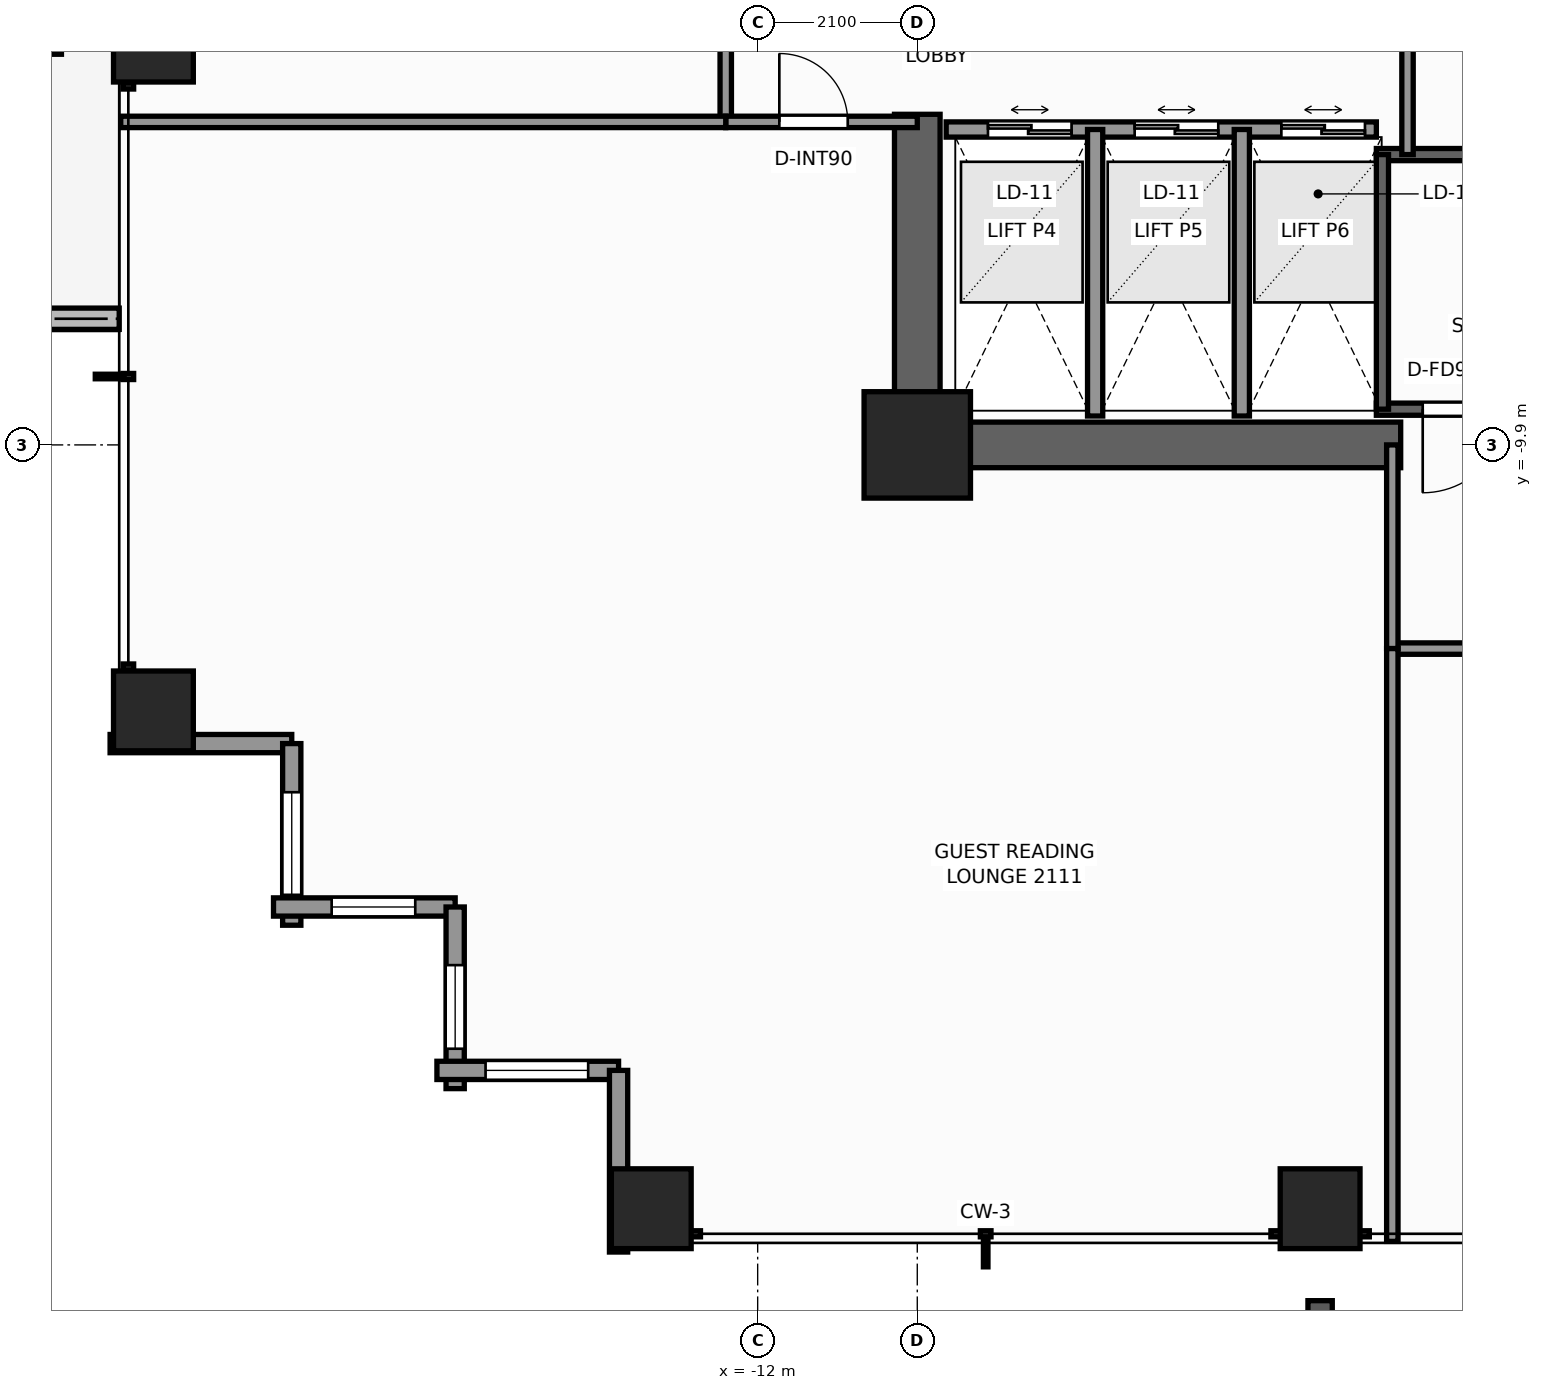
"""IFC4 building model, lengths in metres.
Left out: names, types, materials, properties, quantities, classifications, styles, units other than length and angle.
Written with IfcOpenShell. Run it as: python <this file> out.ifc"""

import sys

from ifc_helpers import new_model, si_unit, direction, frame, frame_2d, origin, origin_2d, place, context, subcontext, project, spatial, rectangle, extrude, element, fill, save


model = new_model("IFC4")
c1 = context("Model", 3, precision=1e-05, world=origin(), true_north=direction((0.0, 1.0)))
c2 = subcontext(c1, "Body", "Model", "MODEL_VIEW")
j1 = project(units=[si_unit("LENGTHUNIT", "METRE"), si_unit("PLANEANGLEUNIT", "RADIAN")], contexts=[c1])
p1 = place(None, origin())
s1 = spatial("IfcSite", under=j1, at=p1, CompositionType="ELEMENT")
p2 = place(p1, origin())
s2 = spatial("IfcBuilding", under=s1, at=p2, CompositionType="ELEMENT")
p3 = place(p2, frame((0.0, 0.0, 75.5)))
s3 = spatial("IfcBuildingStorey", under=s2, at=p3, CompositionType="ELEMENT", Elevation=75.5)
p4 = place(p3, frame((-3.54, -9.9, 0.0), z_axis=(0.0, 0.0, 1.0), x_axis=(-1.0, 0.0, 0.0)))
e1 = element("IfcWall", 1, at=p4, inside=s3, PredefinedType="SHEAR", context=c2, shape_type="SweptSolid", body=[
    extrude(rectangle(XDim=6.66, YDim=0.6, at=frame_2d((3.33, 0.0))), origin(), (0.0, 0.0, 1.0), 3.3),
])
p5 = place(p3, frame((-9.9, -9.6, 0.0), z_axis=(0.0, 0.0, 1.0), x_axis=(0.0, 1.0, 0.0)))
e2 = element("IfcWall", 2, at=p5, inside=s3, PredefinedType="SHEAR", context=c2, shape_type="SweptSolid", body=[
    extrude(rectangle(XDim=4.05, YDim=0.6, at=frame_2d((2.025, 0.0))), origin(), (0.0, 0.0, 1.0), 3.3),
])
p6 = place(p3, frame((-9.9, -9.9, 0.0), z_axis=(0.0, 0.0, 1.0), x_axis=(1.0, 0.0, 0.0)))
e3 = element("IfcColumn", 3, at=p6, inside=s3, PredefinedType="COLUMN", context=c2, shape_type="SweptSolid", body=[
    extrude(rectangle(XDim=1.4, YDim=1.4, at=origin_2d()), origin(), (0.0, 0.0, 1.0), 3.3),
])
for number, where, z_axis, x_axis in (
    (4, (-13.4, -19.95, 0.0), (0.0, 0.0, 1.0), (1.0, 0.0, 0.0)),
    (5, (-4.6, -19.95, 0.0), (0.0, 0.0, 1.0), (1.0, 0.0, 0.0)),
    (6, (-19.95, -13.4, 0.0), (0.0, 0.0, 1.0), (1.0, 0.0, 0.0)),
    (7, (-19.95, -4.6, 0.0), (0.0, 0.0, 1.0), (1.0, 0.0, 0.0)),
):
    element("IfcColumn", number, at=place(p3, frame(where, z_axis=z_axis, x_axis=x_axis)), inside=s3, PredefinedType="COLUMN", context=c2, shape_type="SweptSolid", body=[
        extrude(rectangle(XDim=1.05, YDim=1.05, at=origin_2d()), origin(), (0.0, 0.0, 1.0), 3.3),
    ])
p7 = place(p3, frame((-22.406, -8.24, -0.04), z_axis=(0.0, 0.0, 1.0), x_axis=(1.0, 0.0, 0.0)))
e8 = element("IfcWall", 8, at=p7, inside=s3, PredefinedType="PARAPET", context=c2, shape_type="SweptSolid", body=[
    extrude(rectangle(XDim=2.006, YDim=0.28, at=frame_2d((1.003, 0.0))), origin(), (0.0, 0.0, 1.0), 0.42),
])
p8 = place(p3, frame((-18.13, -13.83, 0.0), z_axis=(0.0, 0.0, 1.0), x_axis=(-1.0, 0.0, 0.0)))
e9 = element("IfcWall", 9, at=p8, inside=s3, PredefinedType="STANDARD", context=c2, shape_type="SweptSolid", body=[
    extrude(rectangle(XDim=2.39, YDim=0.24, at=frame_2d((1.195, 0.0))), origin(), (0.0, 0.0, 1.0), 2.459),
])
p9 = place(p3, frame((-18.13, -16.22, 0.0), z_axis=(0.0, 0.0, 1.0), x_axis=(0.0, 1.0, 0.0)))
e10 = element("IfcWall", 10, at=p9, inside=s3, PredefinedType="STANDARD", context=c2, shape_type="SweptSolid", body=[
    extrude(rectangle(XDim=2.39, YDim=0.24, at=frame_2d((1.195, 0.0))), origin(), (0.0, 0.0, 1.0), 2.459),
])
p10 = place(p9, frame((0.4, 0.0, 0.65)))
e11 = element("IfcOpeningElement", 11, at=p10, cuts=e10, PredefinedType="OPENING", context=c2, shape_type="SweptSolid", body=[
    extrude(rectangle(XDim=1.35, YDim=1.55, at=frame_2d((0.675, 0.775))), frame((0.0, 0.13, 0.0), z_axis=(0.0, -1.0, 0.0), x_axis=(1.0, 0.0, 0.0)), (0.0, 0.0, 1.0), 0.26),
])
p11 = place(p3, frame((-15.98, -15.98, 0.0), z_axis=(0.0, 0.0, 1.0), x_axis=(-1.0, 0.0, 0.0)))
e12 = element("IfcWall", 12, at=p11, inside=s3, PredefinedType="STANDARD", context=c2, shape_type="SweptSolid", body=[
    extrude(rectangle(XDim=2.39, YDim=0.24, at=frame_2d((1.195, 0.0))), origin(), (0.0, 0.0, 1.0), 2.459),
])
p12 = place(p11, frame((0.525, 0.0, 0.65)))
e13 = element("IfcOpeningElement", 13, at=p12, cuts=e12, PredefinedType="OPENING", context=c2, shape_type="SweptSolid", body=[
    extrude(rectangle(XDim=1.1, YDim=1.45, at=frame_2d((0.55, 0.725))), frame((0.0, 0.13, 0.0), z_axis=(0.0, -1.0, 0.0), x_axis=(1.0, 0.0, 0.0)), (0.0, 0.0, 1.0), 0.26),
])
p13 = place(p3, frame((-15.98, -18.37, 0.0), z_axis=(0.0, 0.0, 1.0), x_axis=(0.0, 1.0, 0.0)))
e14 = element("IfcWall", 14, at=p13, inside=s3, PredefinedType="STANDARD", context=c2, shape_type="SweptSolid", body=[
    extrude(rectangle(XDim=2.39, YDim=0.24, at=frame_2d((1.195, 0.0))), origin(), (0.0, 0.0, 1.0), 2.459),
])
p14 = place(p13, frame((0.525, 0.0, 0.65)))
e15 = element("IfcOpeningElement", 15, at=p14, cuts=e14, PredefinedType="OPENING", context=c2, shape_type="SweptSolid", body=[
    extrude(rectangle(XDim=1.1, YDim=1.45, at=frame_2d((0.55, 0.725))), frame((0.0, 0.13, 0.0), z_axis=(0.0, -1.0, 0.0), x_axis=(1.0, 0.0, 0.0)), (0.0, 0.0, 1.0), 0.26),
])
p15 = place(p3, frame((-13.83, -18.13, 0.0), z_axis=(0.0, 0.0, 1.0), x_axis=(-1.0, 0.0, 0.0)))
e16 = element("IfcWall", 16, at=p15, inside=s3, PredefinedType="STANDARD", context=c2, shape_type="SweptSolid", body=[
    extrude(rectangle(XDim=2.39, YDim=0.24, at=frame_2d((1.195, 0.0))), origin(), (0.0, 0.0, 1.0), 2.459),
])
p16 = place(p15, frame((0.4, 0.0, 0.65)))
e17 = element("IfcOpeningElement", 17, at=p16, cuts=e16, PredefinedType="OPENING", context=c2, shape_type="SweptSolid", body=[
    extrude(rectangle(XDim=1.35, YDim=1.55, at=frame_2d((0.675, 0.775))), frame((0.0, 0.13, 0.0), z_axis=(0.0, -1.0, 0.0), x_axis=(1.0, 0.0, 0.0)), (0.0, 0.0, 1.0), 0.26),
])
p17 = place(p3, frame((-13.83, -20.52, 0.0), z_axis=(0.0, 0.0, 1.0), x_axis=(0.0, 1.0, 0.0)))
e18 = element("IfcWall", 18, at=p17, inside=s3, PredefinedType="STANDARD", context=c2, shape_type="SweptSolid", body=[
    extrude(rectangle(XDim=2.39, YDim=0.24, at=frame_2d((1.195, 0.0))), origin(), (0.0, 0.0, 1.0), 2.459),
])
p18 = place(p3, frame((3.86, -9.43, 0.0), z_axis=(0.0, 0.0, 1.0), x_axis=(-1.0, 0.0, 0.0)))
e19 = element("IfcWall", 19, at=p18, inside=s3, PredefinedType="SHEAR", context=c2, shape_type="SweptSolid", body=[
    extrude(rectangle(XDim=7.72, YDim=0.16, at=frame_2d((3.86, 0.0))), origin(), (0.0, 0.0, 1.0), 3.3),
])
p19 = place(p18, frame((6.01, 0.0, 0.0)))
e20 = element("IfcOpeningElement", 20, at=p19, cuts=e19, PredefinedType="OPENING", context=c2, shape_type="SweptSolid", body=[
    extrude(rectangle(XDim=1.1, YDim=2.2, at=frame_2d((0.55, 1.1))), frame((0.0, 0.09, 0.0), z_axis=(0.0, -1.0, 0.0), x_axis=(1.0, 0.0, 0.0)), (0.0, 0.0, 1.0), 0.18),
])
p20 = place(p3, frame((-3.86, -6.08, 0.0), z_axis=(0.0, 0.0, 1.0), x_axis=(1.0, 0.0, 0.0)))
e21 = element("IfcWall", 21, at=p20, inside=s3, PredefinedType="SHEAR", context=c2, shape_type="SweptSolid", body=[
    extrude(rectangle(XDim=7.72, YDim=0.16, at=frame_2d((3.86, 0.0))), origin(), (0.0, 0.0, 1.0), 3.3),
])
p21 = place(p3, frame((-3.78, -9.43, 0.0), z_axis=(0.0, 0.0, 1.0), x_axis=(0.0, 1.0, 0.0)))
e22 = element("IfcWall", 22, at=p21, inside=s3, PredefinedType="SHEAR", context=c2, shape_type="SweptSolid", body=[
    extrude(rectangle(XDim=3.35, YDim=0.16, at=frame_2d((1.675, 0.0))), origin(), (0.0, 0.0, 1.0), 3.3),
])
p22 = place(p3, frame((-9.52, -5.75, 0.0), z_axis=(0.0, 0.0, 1.0), x_axis=(1.0, 0.0, 0.0)))
e23 = element("IfcWall", 23, at=p22, inside=s3, PredefinedType="SOLIDWALL", context=c2, shape_type="SweptSolid", body=[
    extrude(rectangle(XDim=5.66, YDim=0.2, at=frame_2d((2.83, 0.0))), origin(), (0.0, 0.0, 1.0), 3.08),
])
p23 = place(p22, frame((0.55, 0.0, 0.0)))
e24 = element("IfcOpeningElement", 24, at=p23, cuts=e23, PredefinedType="OPENING", context=c2, shape_type="SweptSolid", body=[
    extrude(rectangle(XDim=1.1, YDim=2.2, at=frame_2d((0.55, 1.1))), frame((0.0, 0.11, 0.0), z_axis=(0.0, -1.0, 0.0), x_axis=(1.0, 0.0, 0.0)), (0.0, 0.0, 1.0), 0.22),
])
p24 = place(p22, frame((2.48, 0.0, 0.0)))
e25 = element("IfcOpeningElement", 25, at=p24, cuts=e23, PredefinedType="OPENING", context=c2, shape_type="SweptSolid", body=[
    extrude(rectangle(XDim=1.1, YDim=2.2, at=frame_2d((0.55, 1.1))), frame((0.0, 0.11, 0.0), z_axis=(0.0, -1.0, 0.0), x_axis=(1.0, 0.0, 0.0)), (0.0, 0.0, 1.0), 0.22),
])
p25 = place(p22, frame((4.41, 0.0, 0.0)))
e26 = element("IfcOpeningElement", 26, at=p25, cuts=e23, PredefinedType="OPENING", context=c2, shape_type="SweptSolid", body=[
    extrude(rectangle(XDim=1.1, YDim=2.2, at=frame_2d((0.55, 1.1))), frame((0.0, 0.11, 0.0), z_axis=(0.0, -1.0, 0.0), x_axis=(1.0, 0.0, 0.0)), (0.0, 0.0, 1.0), 0.22),
])
for number, where, z_axis, x_axis in (
    (27, (-7.56, -9.52, 0.0), (0.0, 0.0, 1.0), (0.0, 1.0, 0.0)),
    (28, (-5.63, -9.52, 0.0), (0.0, 0.0, 1.0), (0.0, 1.0, 0.0)),
):
    element("IfcWall", number, at=place(p3, frame(where, z_axis=z_axis, x_axis=x_axis)), inside=s3, PredefinedType="SOLIDWALL", context=c2, shape_type="SweptSolid", body=[
        extrude(rectangle(XDim=3.77, YDim=0.2, at=frame_2d((1.885, 0.0))), origin(), (0.0, 0.0, 1.0), 3.08),
    ])
p26 = place(p3, frame((-3.45, -6.08, 0.0), z_axis=(0.0, 0.0, 1.0), x_axis=(0.0, 1.0, 0.0)))
e29 = element("IfcWall", 29, at=p26, inside=s3, PredefinedType="PARTITIONING", context=c2, shape_type="SweptSolid", body=[
    extrude(rectangle(XDim=2.36, YDim=0.15, at=frame_2d((1.18, 0.0))), origin(), (0.0, 0.0, 1.0), 3.08),
])
p27 = place(p3, frame((-3.65, -12.58, 0.0), z_axis=(0.0, 0.0, 1.0), x_axis=(1.0, 0.0, 0.0)))
e30 = element("IfcWall", 30, at=p27, inside=s3, PredefinedType="PARTITIONING", context=c2, shape_type="SweptSolid", body=[
    extrude(rectangle(XDim=16.23, YDim=0.15, at=frame_2d((8.115, 0.0))), origin(), (0.0, 0.0, 1.0), 2.292),
])
p28 = place(p27, frame((1.405, 0.0, 0.0)))
e31 = element("IfcOpeningElement", 31, at=p28, cuts=e30, PredefinedType="OPENING", context=c2, shape_type="SweptSolid", body=[
    extrude(rectangle(XDim=0.95, YDim=2.06, at=frame_2d((0.475, 1.03))), frame((0.0, 0.085, 0.0), z_axis=(0.0, -1.0, 0.0), x_axis=(1.0, 0.0, 0.0)), (0.0, 0.0, 1.0), 0.17),
])
p29 = place(p27, frame((9.469, 0.0, 0.0)))
e32 = element("IfcOpeningElement", 32, at=p29, cuts=e30, PredefinedType="OPENING", context=c2, shape_type="SweptSolid", body=[
    extrude(rectangle(XDim=0.9, YDim=2.06, at=frame_2d((0.45, 1.03))), frame((0.0, 0.085, 0.0), z_axis=(0.0, -1.0, 0.0), x_axis=(1.0, 0.0, 0.0)), (0.0, 0.0, 1.0), 0.17),
])
p30 = place(p27, frame((11.629, 0.0, 0.0)))
e33 = element("IfcOpeningElement", 33, at=p30, cuts=e30, PredefinedType="OPENING", context=c2, shape_type="SweptSolid", body=[
    extrude(rectangle(XDim=0.95, YDim=2.06, at=frame_2d((0.475, 1.03))), frame((0.0, 0.085, 0.0), z_axis=(0.0, -1.0, 0.0), x_axis=(1.0, 0.0, 0.0)), (0.0, 0.0, 1.0), 0.17),
])
p31 = place(p3, frame((-3.65, -12.58, 0.0), z_axis=(0.0, 0.0, 1.0), x_axis=(0.0, 1.0, 0.0)))
e34 = element("IfcWall", 34, at=p31, inside=s3, PredefinedType="PARTITIONING", context=c2, shape_type="SweptSolid", body=[
    extrude(rectangle(XDim=2.68, YDim=0.15, at=frame_2d((1.34, 0.0))), origin(), (0.0, 0.0, 1.0), 3.08),
])
p32 = place(p3, frame((-12.42, -5.65, 0.0), z_axis=(0.0, 0.0, 1.0), x_axis=(0.0, 1.0, 0.0)))
e35 = element("IfcWall", 35, at=p32, inside=s3, PredefinedType="PARTITIONING", context=c2, shape_type="SweptSolid", body=[
    extrude(rectangle(XDim=3.6, YDim=0.15, at=frame_2d((1.8, 0.0))), origin(), (0.0, 0.0, 1.0), 2.292),
])
p33 = place(p32, frame((2.156, 0.0, 0.0)))
e36 = element("IfcOpeningElement", 36, at=p33, cuts=e35, PredefinedType="OPENING", context=c2, shape_type="SweptSolid", body=[
    extrude(rectangle(XDim=0.9, YDim=2.06, at=frame_2d((0.45, 1.03))), frame((0.0, 0.085, 0.0), z_axis=(0.0, -1.0, 0.0), x_axis=(1.0, 0.0, 0.0)), (0.0, 0.0, 1.0), 0.17),
])
p34 = place(p3, frame((-12.42, -5.65, 0.0), z_axis=(0.0, 0.0, 1.0), x_axis=(1.0, 0.0, 0.0)))
e37 = element("IfcWall", 37, at=p34, inside=s3, PredefinedType="PARTITIONING", context=c2, shape_type="SweptSolid", body=[
    extrude(rectangle(XDim=2.52, YDim=0.15, at=frame_2d((1.26, 0.0))), origin(), (0.0, 0.0, 1.0), 3.08),
])
p35 = place(p34, frame((0.705, 0.0, 0.0)))
e38 = element("IfcOpeningElement", 38, at=p35, cuts=e37, PredefinedType="OPENING", context=c2, shape_type="SweptSolid", body=[
    extrude(rectangle(XDim=0.9, YDim=2.06, at=frame_2d((0.45, 1.03))), frame((0.0, 0.085, 0.0), z_axis=(0.0, -1.0, 0.0), x_axis=(1.0, 0.0, 0.0)), (0.0, 0.0, 1.0), 0.17),
])
p36 = place(p3, frame((-20.38, -5.65, 0.0), z_axis=(0.0, 0.0, 1.0), x_axis=(1.0, 0.0, 0.0)))
e39 = element("IfcWall", 39, at=p36, inside=s3, PredefinedType="PARTITIONING", context=c2, shape_type="SweptSolid", body=[
    extrude(rectangle(XDim=7.96, YDim=0.15, at=frame_2d((3.98, 0.0))), origin(), (0.0, 0.0, 1.0), 2.449),
])
p37 = place(p3, frame((-3.65, -20.38, 0.0), z_axis=(0.0, 0.0, 1.0), x_axis=(0.0, 1.0, 0.0)))
e40 = element("IfcWall", 40, at=p37, inside=s3, PredefinedType="PARTITIONING", context=c2, shape_type="SweptSolid", body=[
    extrude(rectangle(XDim=7.8, YDim=0.15, at=frame_2d((3.9, 0.0))), origin(), (0.0, 0.0, 1.0), 2.449),
])
p38 = place(p10, origin())
e41 = element("IfcWindow", 41, at=p38, inside=s3, PartitioningType="SINGLE_PANEL", PredefinedType="WINDOW", context=c2, shape_type="SweptSolid", body=[
    extrude(rectangle(XDim=1.35, YDim=1.55, at=frame_2d((0.675, 0.775))), frame((0.0, 0.03, 0.0), z_axis=(0.0, -1.0, 0.0), x_axis=(1.0, 0.0, 0.0)), (0.0, 0.0, 1.0), 0.06),
])
fill(e11, e41)
p39 = place(p12, origin())
e42 = element("IfcWindow", 42, at=p39, inside=s3, PartitioningType="SINGLE_PANEL", PredefinedType="WINDOW", context=c2, shape_type="SweptSolid", body=[
    extrude(rectangle(XDim=1.1, YDim=1.45, at=frame_2d((0.55, 0.725))), frame((0.0, 0.03, 0.0), z_axis=(0.0, -1.0, 0.0), x_axis=(1.0, 0.0, 0.0)), (0.0, 0.0, 1.0), 0.06),
])
fill(e13, e42)
p40 = place(p14, origin())
e43 = element("IfcWindow", 43, at=p40, inside=s3, PartitioningType="SINGLE_PANEL", PredefinedType="WINDOW", context=c2, shape_type="SweptSolid", body=[
    extrude(rectangle(XDim=1.1, YDim=1.45, at=frame_2d((0.55, 0.725))), frame((0.0, 0.03, 0.0), z_axis=(0.0, -1.0, 0.0), x_axis=(1.0, 0.0, 0.0)), (0.0, 0.0, 1.0), 0.06),
])
fill(e15, e43)
p41 = place(p16, origin())
e44 = element("IfcWindow", 44, at=p41, inside=s3, PartitioningType="SINGLE_PANEL", PredefinedType="WINDOW", context=c2, shape_type="SweptSolid", body=[
    extrude(rectangle(XDim=1.35, YDim=1.55, at=frame_2d((0.675, 0.775))), frame((0.0, 0.03, 0.0), z_axis=(0.0, -1.0, 0.0), x_axis=(1.0, 0.0, 0.0)), (0.0, 0.0, 1.0), 0.06),
])
fill(e17, e44)
p42 = place(p19, origin())
e45 = element("IfcDoor", 45, at=p42, inside=s3, OperationType="SINGLE_SWING_RIGHT", PredefinedType="DOOR", context=c2, shape_type="SweptSolid", body=[
    extrude(rectangle(XDim=1.1, YDim=2.2, at=frame_2d((0.55, 1.1))), frame((0.0, 0.025, 0.0), z_axis=(0.0, -1.0, 0.0), x_axis=(1.0, 0.0, 0.0)), (0.0, 0.0, 1.0), 0.05),
])
fill(e20, e45)
p43 = place(p23, origin())
e46 = element("IfcDoor", 46, at=p43, inside=s3, OperationType="DOUBLE_DOOR_SLIDING", PredefinedType="DOOR", context=c2, shape_type="SweptSolid", body=[
    extrude(rectangle(XDim=1.1, YDim=2.2, at=frame_2d((0.55, 1.1))), frame((0.0, 0.025, 0.0), z_axis=(0.0, -1.0, 0.0), x_axis=(1.0, 0.0, 0.0)), (0.0, 0.0, 1.0), 0.05),
])
fill(e24, e46)
p44 = place(p24, origin())
e47 = element("IfcDoor", 47, at=p44, inside=s3, OperationType="DOUBLE_DOOR_SLIDING", PredefinedType="DOOR", context=c2, shape_type="SweptSolid", body=[
    extrude(rectangle(XDim=1.1, YDim=2.2, at=frame_2d((0.55, 1.1))), frame((0.0, 0.025, 0.0), z_axis=(0.0, -1.0, 0.0), x_axis=(1.0, 0.0, 0.0)), (0.0, 0.0, 1.0), 0.05),
])
fill(e25, e47)
p45 = place(p25, origin())
e48 = element("IfcDoor", 48, at=p45, inside=s3, OperationType="DOUBLE_DOOR_SLIDING", PredefinedType="DOOR", context=c2, shape_type="SweptSolid", body=[
    extrude(rectangle(XDim=1.1, YDim=2.2, at=frame_2d((0.55, 1.1))), frame((0.0, 0.025, 0.0), z_axis=(0.0, -1.0, 0.0), x_axis=(1.0, 0.0, 0.0)), (0.0, 0.0, 1.0), 0.05),
])
fill(e26, e48)
p46 = place(p35, origin())
e49 = element("IfcDoor", 49, at=p46, inside=s3, OperationType="SINGLE_SWING_LEFT", PredefinedType="DOOR", context=c2, shape_type="SweptSolid", body=[
    extrude(rectangle(XDim=0.9, YDim=2.06, at=frame_2d((0.45, 1.03))), frame((0.0, 0.025, 0.0), z_axis=(0.0, -1.0, 0.0), x_axis=(1.0, 0.0, 0.0)), (0.0, 0.0, 1.0), 0.05),
])
fill(e38, e49)
save(model, sys.argv[1])
